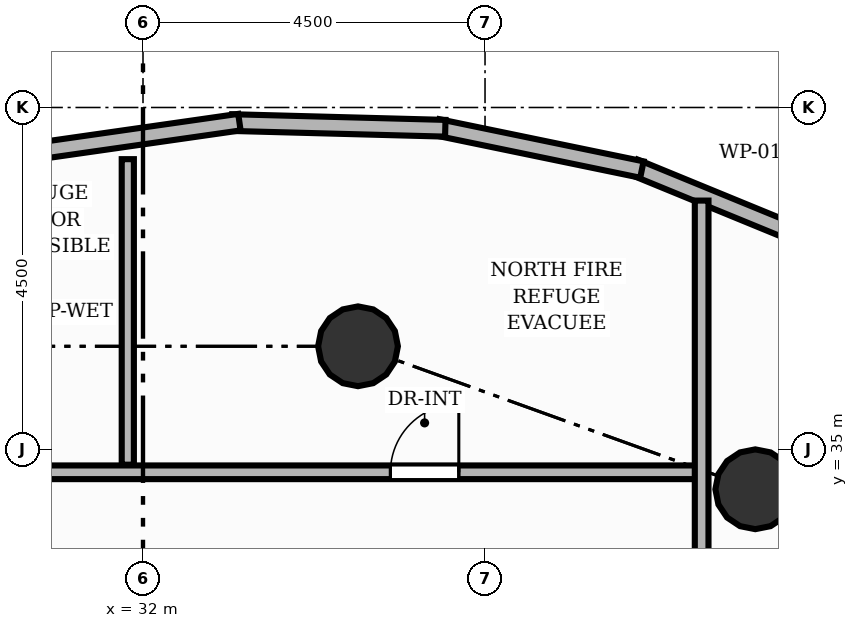
"""IFC4 building model, lengths in metres.
Left out: names, types, materials, properties, quantities, classifications, styles, units other than length and angle.
Written with IfcOpenShell. Run it as: python <this file> out.ifc"""

import sys

from ifc_helpers import new_model, si_unit, direction, frame, frame_2d, origin, origin_2d, place, context, subcontext, project, spatial, rectangle, circle, extrude, element, fill, save


model = new_model("IFC4")
c1 = context("Model", 3, precision=1e-05, world=origin(), true_north=direction((0.0, 1.0)))
c2 = subcontext(c1, "Body", "Model", "MODEL_VIEW")
j1 = project(units=[si_unit("LENGTHUNIT", "METRE"), si_unit("PLANEANGLEUNIT", "RADIAN")], contexts=[c1])
p1 = place(None, origin())
s1 = spatial("IfcSite", under=j1, at=p1, CompositionType="ELEMENT")
p2 = place(p1, origin())
s2 = spatial("IfcBuilding", under=s1, at=p2, CompositionType="ELEMENT")
p3 = place(p2, frame((0.0, 0.0, 158.56)))
s3 = spatial("IfcBuildingStorey", under=s2, at=p3, CompositionType="ELEMENT", Elevation=158.56)
for number, where, z_axis, x_axis in (
    (1, (40.056, 34.477, 0.0), (0.0, 0.0, 1.0), (1.0, 0.0, 0.0)),
    (2, (34.829, 36.358, 0.0), (0.0, 0.0, 1.0), (1.0, 0.0, 0.0)),
):
    element("IfcColumn", number, at=place(p3, frame(where, z_axis=z_axis, x_axis=x_axis)), inside=s3, PredefinedType="COLUMN", context=c2, shape_type="SweptSolid", body=[
        extrude(circle(Radius=0.525, at=origin_2d()), origin(), (0.0, 0.0, 1.0), 4.48),
    ])
p4 = place(p3, frame((38.468, 38.712, 0.0), z_axis=(0.0, 0.0, 1.0), x_axis=(0.925126004984, -0.379660209797, 0.0)))
e3 = element("IfcWall", 3, at=p4, inside=s3, PredefinedType="PARAPET", context=c2, shape_type="SweptSolid", body=[
    extrude(rectangle(XDim=2.683, YDim=0.22, at=frame_2d((1.341, 0.0))), origin(), (0.0, 0.0, 1.0), 1.15),
])
p5 = place(p3, frame((35.879, 39.238, 0.0), z_axis=(0.0, 0.0, 1.0), x_axis=(0.979324939828, -0.202293505163, 0.0)))
e4 = element("IfcWall", 4, at=p5, inside=s3, PredefinedType="PARAPET", context=c2, shape_type="SweptSolid", body=[
    extrude(rectangle(XDim=2.742, YDim=0.22, at=frame_2d((1.371, 0.0))), origin(), (0.0, 0.0, 1.0), 1.15),
])
p6 = place(p3, frame((33.17, 39.302, 0.0), z_axis=(0.0, 0.0, 1.0), x_axis=(0.999645930397, -0.026608529463, 0.0)))
e5 = element("IfcWall", 5, at=p6, inside=s3, PredefinedType="PARAPET", context=c2, shape_type="SweptSolid", body=[
    extrude(rectangle(XDim=2.808, YDim=0.22, at=frame_2d((1.404, 0.0))), origin(), (0.0, 0.0, 1.0), 1.15),
])
p7 = place(p3, frame((30.426, 38.9, 0.0), z_axis=(0.0, 0.0, 1.0), x_axis=(0.989906941775, 0.141718900029, 0.0)))
e6 = element("IfcWall", 6, at=p7, inside=s3, PredefinedType="PARAPET", context=c2, shape_type="SweptSolid", body=[
    extrude(rectangle(XDim=2.872, YDim=0.22, at=frame_2d((1.436, 0.0))), origin(), (0.0, 0.0, 1.0), 1.15),
])
p8 = place(p3, frame((22.5, 34.7, 0.0), z_axis=(0.0, 0.0, 1.0), x_axis=(1.0, 0.0, 0.0)))
e7 = element("IfcWall", 7, at=p8, inside=s3, PredefinedType="PARTITIONING", context=c2, shape_type="SweptSolid", body=[
    extrude(rectangle(XDim=16.851, YDim=0.18, at=frame_2d((8.425, 0.0))), origin(), (0.0, 0.0, 1.0), 3.768),
])
p9 = place(p8, frame((12.755, 0.0, 0.0)))
e8 = element("IfcOpeningElement", 8, at=p9, cuts=e7, PredefinedType="OPENING", context=c2, shape_type="SweptSolid", body=[
    extrude(rectangle(XDim=0.9, YDim=2.1, at=frame_2d((0.45, 1.05))), frame((0.0, 0.1, 0.0), z_axis=(0.0, -1.0, 0.0), x_axis=(1.0, 0.0, 0.0)), (0.0, 0.0, 1.0), 0.2),
])
p10 = place(p8, frame((7.19, 0.0, 0.0)))
e9 = element("IfcOpeningElement", 9, at=p10, cuts=e7, PredefinedType="OPENING", context=c2, shape_type="SweptSolid", body=[
    extrude(rectangle(XDim=0.9, YDim=2.1, at=frame_2d((0.45, 1.05))), frame((0.0, 0.1, 0.0), z_axis=(0.0, -1.0, 0.0), x_axis=(1.0, 0.0, 0.0)), (0.0, 0.0, 1.0), 0.2),
])
p11 = place(p8, frame((4.02, 0.0, 0.0)))
e10 = element("IfcOpeningElement", 10, at=p11, cuts=e7, PredefinedType="OPENING", context=c2, shape_type="SweptSolid", body=[
    extrude(rectangle(XDim=0.9, YDim=2.1, at=frame_2d((0.45, 1.05))), frame((0.0, 0.1, 0.0), z_axis=(0.0, -1.0, 0.0), x_axis=(1.0, 0.0, 0.0)), (0.0, 0.0, 1.0), 0.2),
])
p12 = place(p3, frame((39.35, 38.275, 0.0), z_axis=(0.0, 0.0, 1.0), x_axis=(0.0, -1.0, 0.0)))
e11 = element("IfcWall", 11, at=p12, inside=s3, PredefinedType="PARTITIONING", context=c2, shape_type="SweptSolid", body=[
    extrude(rectangle(XDim=13.125, YDim=0.18, at=frame_2d((6.562, 0.0))), origin(), (0.0, 0.0, 1.0), 4.235),
])
p13 = place(p12, frame((7.93, 0.0, 0.0)))
e12 = element("IfcOpeningElement", 12, at=p13, cuts=e11, PredefinedType="OPENING", context=c2, shape_type="SweptSolid", body=[
    extrude(rectangle(XDim=0.9, YDim=2.1, at=frame_2d((0.45, 1.05))), frame((0.0, 0.1, 0.0), z_axis=(0.0, -1.0, 0.0), x_axis=(1.0, 0.0, 0.0)), (0.0, 0.0, 1.0), 0.2),
])
p14 = place(p3, frame((31.8, 34.8, 0.0), z_axis=(0.0, 0.0, 1.0), x_axis=(0.0, 1.0, 0.0)))
e13 = element("IfcWall", 13, at=p14, inside=s3, PredefinedType="PLUMBINGWALL", context=c2, shape_type="SweptSolid", body=[
    extrude(rectangle(XDim=4.02, YDim=0.16, at=frame_2d((2.01, 0.0))), origin(), (0.0, 0.0, 1.0), 4.235),
])
p15 = place(p9, origin())
e14 = element("IfcDoor", 14, at=p15, inside=s3, OperationType="SINGLE_SWING_RIGHT", PredefinedType="DOOR", context=c2, shape_type="SweptSolid", body=[
    extrude(rectangle(XDim=0.9, YDim=2.1, at=frame_2d((0.45, 1.05))), frame((0.0, 0.025, 0.0), z_axis=(0.0, -1.0, 0.0), x_axis=(1.0, 0.0, 0.0)), (0.0, 0.0, 1.0), 0.05),
])
fill(e8, e14)
save(model, sys.argv[1])
